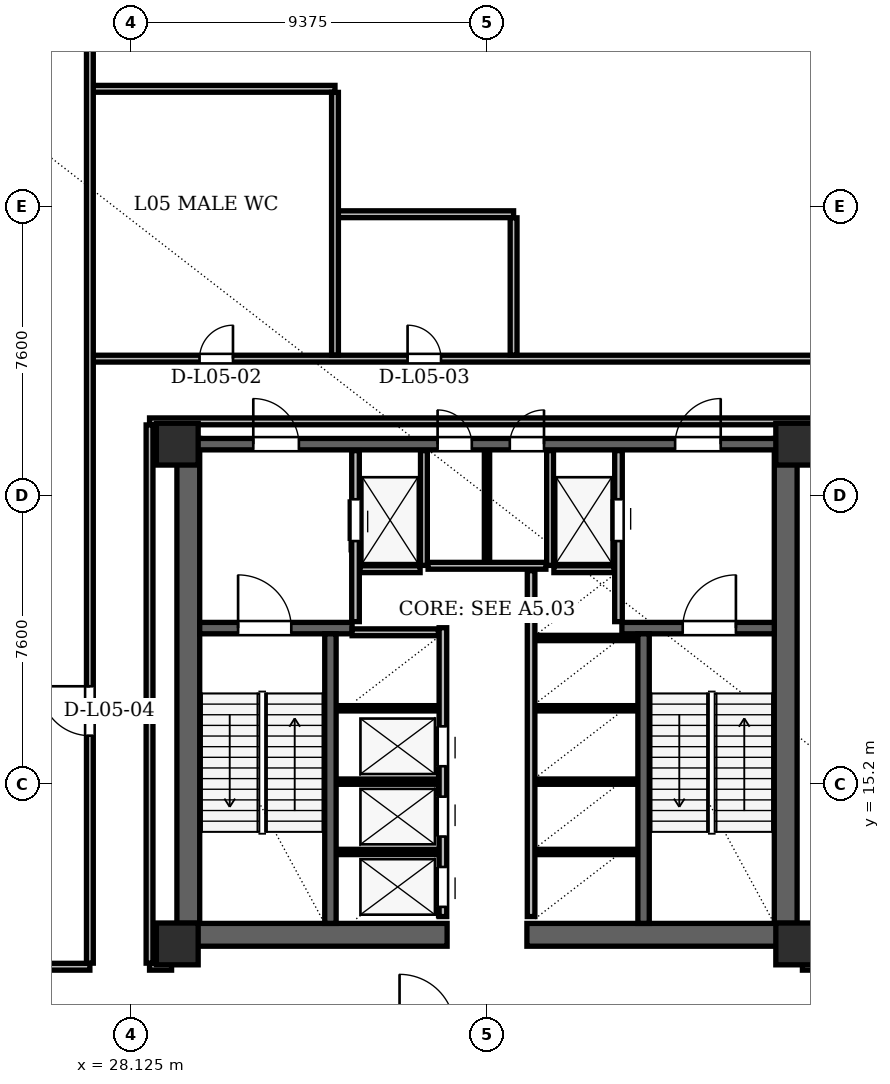
"""IFC4 building model, lengths in metres.
Left out: names, types, materials, properties, quantities, classifications, styles, units other than length and angle.
Written with IfcOpenShell. Run it as: python <this file> out.ifc"""

import sys

from ifc_helpers import new_model, si_unit, direction, frame, frame_2d, origin, origin_2d, place, context, subcontext, project, spatial, rectangle, hollow_rectangle, extrude, element, fill, save


model = new_model("IFC4")
c1 = context("Model", 3, precision=1e-05, world=origin(), true_north=direction((0.0, 1.0)))
c2 = subcontext(c1, "Body", "Model", "MODEL_VIEW")
j1 = project(units=[si_unit("LENGTHUNIT", "METRE"), si_unit("PLANEANGLEUNIT", "RADIAN")], contexts=[c1])
p1 = place(None, origin())
s1 = spatial("IfcSite", under=j1, at=p1, CompositionType="ELEMENT")
p2 = place(p1, origin())
s2 = spatial("IfcBuilding", under=s1, at=p2, CompositionType="ELEMENT")
p3 = place(p2, frame((0.0, 0.0, 22.5)))
s3 = spatial("IfcBuildingStorey", under=s2, at=p3, CompositionType="ELEMENT", Elevation=22.5)
for number, where, z_axis, x_axis in (
    (1, (29.35, 11.0, 0.0), (0.0, 0.0, 1.0), (1.0, 0.0, 0.0)),
    (2, (45.65, 11.0, 0.0), (0.0, 0.0, 1.0), (1.0, 0.0, 0.0)),
    (3, (45.65, 24.15, 0.0), (0.0, 0.0, 1.0), (1.0, 0.0, 0.0)),
    (4, (29.35, 24.15, 0.0), (0.0, 0.0, 1.0), (1.0, 0.0, 0.0)),
):
    element("IfcColumn", number, at=place(p3, frame(where, z_axis=z_axis, x_axis=x_axis)), inside=s3, PredefinedType="COLUMN", context=c2, shape_type="SweptSolid", body=[
        extrude(hollow_rectangle(XDim=1.1, YDim=1.1, WallThickness=0.09, at=origin_2d()), origin(), (0.0, 0.0, 1.0), 4.8),
    ])
for number, where, z_axis, x_axis in (
    (5, (29.64, 11.0, 0.0), (0.0, 0.0, 1.0), (0.0, 1.0, 0.0)),
    (6, (45.36, 11.0, 0.0), (0.0, 0.0, 1.0), (0.0, 1.0, 0.0)),
):
    element("IfcWall", number, at=place(p3, frame(where, z_axis=z_axis, x_axis=x_axis)), inside=s3, PredefinedType="SHEAR", context=c2, shape_type="SweptSolid", body=[
        extrude(rectangle(XDim=13.3, YDim=0.6, at=frame_2d((6.65, 0.0))), origin(), (0.0, 0.0, 1.0), 4.56),
    ])
for number, where, z_axis, x_axis in (
    (7, (29.35, 11.24, 0.0), (0.0, 0.0, 1.0), (1.0, 0.0, 0.0)),
    (8, (38.55, 11.24, 0.0), (0.0, 0.0, 1.0), (1.0, 0.0, 0.0)),
):
    element("IfcWall", number, at=place(p3, frame(where, z_axis=z_axis, x_axis=x_axis)), inside=s3, PredefinedType="SHEAR", context=c2, shape_type="SweptSolid", body=[
        extrude(rectangle(XDim=7.1, YDim=0.6, at=frame_2d((3.55, 0.0))), origin(), (0.0, 0.0, 1.0), 4.56),
    ])
p4 = place(p3, frame((29.65, 24.15, 0.0), z_axis=(0.0, 0.0, 1.0), x_axis=(1.0, 0.0, 0.0)))
e9 = element("IfcWall", 9, at=p4, inside=s3, PredefinedType="SHEAR", context=c2, shape_type="SweptSolid", body=[
    extrude(rectangle(XDim=15.7, YDim=0.3, at=frame_2d((7.85, 0.0))), origin(), (0.0, 0.0, 1.0), 4.56),
])
p5 = place(p4, frame((1.7, 0.0, 0.0)))
e10 = element("IfcOpeningElement", 10, at=p5, cuts=e9, PredefinedType="OPENING", context=c2, shape_type="SweptSolid", body=[
    extrude(rectangle(XDim=1.2, YDim=2.2, at=frame_2d((0.6, 1.1))), frame((0.0, 0.15, 0.0), z_axis=(0.0, -1.0, 0.0), x_axis=(1.0, 0.0, 0.0)), (0.0, 0.0, 1.0), 0.3),
])
p6 = place(p4, frame((12.8, 0.0, 0.0)))
e11 = element("IfcOpeningElement", 11, at=p6, cuts=e9, PredefinedType="OPENING", context=c2, shape_type="SweptSolid", body=[
    extrude(rectangle(XDim=1.2, YDim=2.2, at=frame_2d((0.6, 1.1))), frame((0.0, 0.15, 0.0), z_axis=(0.0, -1.0, 0.0), x_axis=(1.0, 0.0, 0.0)), (0.0, 0.0, 1.0), 0.3),
])
p7 = place(p4, frame((6.55, 0.0, 0.0)))
e12 = element("IfcOpeningElement", 12, at=p7, cuts=e9, PredefinedType="OPENING", context=c2, shape_type="SweptSolid", body=[
    extrude(rectangle(XDim=0.9, YDim=2.05, at=frame_2d((0.45, 1.025))), frame((0.0, 0.15, 0.0), z_axis=(0.0, -1.0, 0.0), x_axis=(1.0, 0.0, 0.0)), (0.0, 0.0, 1.0), 0.3),
])
p8 = place(p4, frame((8.45, 0.0, 0.0)))
e13 = element("IfcOpeningElement", 13, at=p8, cuts=e9, PredefinedType="OPENING", context=c2, shape_type="SweptSolid", body=[
    extrude(rectangle(XDim=0.9, YDim=2.05, at=frame_2d((0.45, 1.025))), frame((0.0, 0.15, 0.0), z_axis=(0.0, -1.0, 0.0), x_axis=(1.0, 0.0, 0.0)), (0.0, 0.0, 1.0), 0.3),
])
p9 = place(p3, frame((29.94, 19.31, 0.0), z_axis=(0.0, 0.0, 1.0), x_axis=(1.0, 0.0, 0.0)))
e14 = element("IfcWall", 14, at=p9, inside=s3, PredefinedType="SHEAR", context=c2, shape_type="SweptSolid", body=[
    extrude(rectangle(XDim=4.01, YDim=0.3, at=frame_2d((2.005, 0.0))), origin(), (0.0, 0.0, 1.0), 4.56),
])
p10 = place(p9, frame((1.01, 0.0, 0.0)))
e15 = element("IfcOpeningElement", 15, at=p10, cuts=e14, PredefinedType="OPENING", context=c2, shape_type="SweptSolid", body=[
    extrude(rectangle(XDim=1.4, YDim=2.2, at=frame_2d((0.7, 1.1))), frame((0.0, 0.15, 0.0), z_axis=(0.0, -1.0, 0.0), x_axis=(1.0, 0.0, 0.0)), (0.0, 0.0, 1.0), 0.3),
])
p11 = place(p3, frame((41.05, 19.31, 0.0), z_axis=(0.0, 0.0, 1.0), x_axis=(1.0, 0.0, 0.0)))
e16 = element("IfcWall", 16, at=p11, inside=s3, PredefinedType="SHEAR", context=c2, shape_type="SweptSolid", body=[
    extrude(rectangle(XDim=4.01, YDim=0.3, at=frame_2d((2.005, 0.0))), origin(), (0.0, 0.0, 1.0), 4.56),
])
p12 = place(p11, frame((1.6, 0.0, 0.0)))
e17 = element("IfcOpeningElement", 17, at=p12, cuts=e16, PredefinedType="OPENING", context=c2, shape_type="SweptSolid", body=[
    extrude(rectangle(XDim=1.4, YDim=2.2, at=frame_2d((0.7, 1.1))), frame((0.0, 0.15, 0.0), z_axis=(0.0, -1.0, 0.0), x_axis=(1.0, 0.0, 0.0)), (0.0, 0.0, 1.0), 0.3),
])
for number, where, z_axis, x_axis in (
    (18, (33.38, 11.54, 0.0), (0.0, 0.0, 1.0), (0.0, 1.0, 0.0)),
    (19, (41.62, 11.54, 0.0), (0.0, 0.0, 1.0), (0.0, 1.0, 0.0)),
):
    element("IfcWall", number, at=place(p3, frame(where, z_axis=z_axis, x_axis=x_axis)), inside=s3, PredefinedType="SHEAR", context=c2, shape_type="SweptSolid", body=[
        extrude(rectangle(XDim=7.62, YDim=0.3, at=frame_2d((3.81, 0.0))), origin(), (0.0, 0.0, 1.0), 4.56),
    ])
p13 = place(p3, frame((34.04, 19.48, 0.0), z_axis=(0.0, 0.0, 1.0), x_axis=(0.0, 1.0, 0.0)))
e20 = element("IfcWall", 20, at=p13, inside=s3, PredefinedType="PARTITIONING", context=c2, shape_type="SweptSolid", body=[
    extrude(rectangle(XDim=4.5, YDim=0.2, at=frame_2d((2.25, 0.0))), origin(), (0.0, 0.0, 1.0), 3.6),
])
p14 = place(p13, frame((2.12, 0.0, 0.0)))
e21 = element("IfcOpeningElement", 21, at=p14, cuts=e20, PredefinedType="OPENING", context=c2, shape_type="SweptSolid", body=[
    extrude(rectangle(XDim=1.1, YDim=2.2, at=frame_2d((0.55, 1.1))), frame((0.0, 0.1, 0.0), z_axis=(0.0, -1.0, 0.0), x_axis=(1.0, 0.0, 0.0)), (0.0, 0.0, 1.0), 0.2),
])
p15 = place(p3, frame((35.84, 20.96, 0.0), z_axis=(0.0, 0.0, 1.0), x_axis=(0.0, 1.0, 0.0)))
e22 = element("IfcWall", 22, at=p15, inside=s3, PredefinedType="PARTITIONING", context=c2, shape_type="SweptSolid", body=[
    extrude(rectangle(XDim=3.02, YDim=0.18, at=frame_2d((1.51, 0.0))), origin(), (0.0, 0.0, 1.0), 3.6),
])
p16 = place(p3, frame((34.16, 20.86, 0.0), z_axis=(0.0, 0.0, 1.0), x_axis=(1.0, 0.0, 0.0)))
e23 = element("IfcWall", 23, at=p16, inside=s3, PredefinedType="PARTITIONING", context=c2, shape_type="SweptSolid", body=[
    extrude(rectangle(XDim=1.58, YDim=0.18, at=frame_2d((0.79, 0.0))), origin(), (0.0, 0.0, 1.0), 4.56),
])
p17 = place(p3, frame((40.96, 19.48, 0.0), z_axis=(0.0, 0.0, 1.0), x_axis=(0.0, 1.0, 0.0)))
e24 = element("IfcWall", 24, at=p17, inside=s3, PredefinedType="PARTITIONING", context=c2, shape_type="SweptSolid", body=[
    extrude(rectangle(XDim=4.5, YDim=0.2, at=frame_2d((2.25, 0.0))), origin(), (0.0, 0.0, 1.0), 3.6),
])
p18 = place(p17, frame((2.12, 0.0, 0.0)))
e25 = element("IfcOpeningElement", 25, at=p18, cuts=e24, PredefinedType="OPENING", context=c2, shape_type="SweptSolid", body=[
    extrude(rectangle(XDim=1.1, YDim=2.2, at=frame_2d((0.55, 1.1))), frame((0.0, 0.1, 0.0), z_axis=(0.0, -1.0, 0.0), x_axis=(1.0, 0.0, 0.0)), (0.0, 0.0, 1.0), 0.2),
])
p19 = place(p3, frame((39.16, 20.96, 0.0), z_axis=(0.0, 0.0, 1.0), x_axis=(0.0, 1.0, 0.0)))
e26 = element("IfcWall", 26, at=p19, inside=s3, PredefinedType="PARTITIONING", context=c2, shape_type="SweptSolid", body=[
    extrude(rectangle(XDim=3.02, YDim=0.18, at=frame_2d((1.51, 0.0))), origin(), (0.0, 0.0, 1.0), 3.6),
])
p20 = place(p3, frame((39.26, 20.86, 0.0), z_axis=(0.0, 0.0, 1.0), x_axis=(1.0, 0.0, 0.0)))
e27 = element("IfcWall", 27, at=p20, inside=s3, PredefinedType="PARTITIONING", context=c2, shape_type="SweptSolid", body=[
    extrude(rectangle(XDim=1.58, YDim=0.18, at=frame_2d((0.79, 0.0))), origin(), (0.0, 0.0, 1.0), 4.56),
])
p21 = place(p3, frame((36.34, 11.72, 0.0), z_axis=(0.0, 0.0, 1.0), x_axis=(0.0, 1.0, 0.0)))
e28 = element("IfcWall", 28, at=p21, inside=s3, PredefinedType="PARTITIONING", context=c2, shape_type="SweptSolid", body=[
    extrude(rectangle(XDim=7.6, YDim=0.2, at=frame_2d((3.8, 0.0))), origin(), (0.0, 0.0, 1.0), 4.56),
])
p22 = place(p21, frame((0.255, 0.0, 0.0)))
e29 = element("IfcOpeningElement", 29, at=p22, cuts=e28, PredefinedType="OPENING", context=c2, shape_type="SweptSolid", body=[
    extrude(rectangle(XDim=1.05, YDim=2.15, at=frame_2d((0.525, 1.075))), frame((0.0, 0.1, 0.0), z_axis=(0.0, -1.0, 0.0), x_axis=(1.0, 0.0, 0.0)), (0.0, 0.0, 1.0), 0.2),
])
p23 = place(p21, frame((2.105, 0.0, 0.0)))
e30 = element("IfcOpeningElement", 30, at=p23, cuts=e28, PredefinedType="OPENING", context=c2, shape_type="SweptSolid", body=[
    extrude(rectangle(XDim=1.05, YDim=2.15, at=frame_2d((0.525, 1.075))), frame((0.0, 0.1, 0.0), z_axis=(0.0, -1.0, 0.0), x_axis=(1.0, 0.0, 0.0)), (0.0, 0.0, 1.0), 0.2),
])
p24 = place(p21, frame((3.955, 0.0, 0.0)))
e31 = element("IfcOpeningElement", 31, at=p24, cuts=e28, PredefinedType="OPENING", context=c2, shape_type="SweptSolid", body=[
    extrude(rectangle(XDim=1.05, YDim=2.15, at=frame_2d((0.525, 1.075))), frame((0.0, 0.1, 0.0), z_axis=(0.0, -1.0, 0.0), x_axis=(1.0, 0.0, 0.0)), (0.0, 0.0, 1.0), 0.2),
])
p25 = place(p3, frame((33.95, 19.2, 0.0), z_axis=(0.0, 0.0, 1.0), x_axis=(1.0, 0.0, 0.0)))
e32 = element("IfcWall", 32, at=p25, inside=s3, PredefinedType="PARTITIONING", context=c2, shape_type="SweptSolid", body=[
    extrude(rectangle(XDim=2.27, YDim=0.18, at=frame_2d((1.135, 0.0))), origin(), (0.0, 0.0, 1.0), 4.56),
])
for number, where, z_axis, x_axis in (
    (33, (33.56, 13.42, 0.0), (0.0, 0.0, 1.0), (1.0, 0.0, 0.0)),
    (34, (33.56, 15.27, 0.0), (0.0, 0.0, 1.0), (1.0, 0.0, 0.0)),
    (35, (33.56, 17.2, 0.0), (0.0, 0.0, 1.0), (1.0, 0.0, 0.0)),
):
    element("IfcWall", number, at=place(p3, frame(where, z_axis=z_axis, x_axis=x_axis)), inside=s3, PredefinedType="PARTITIONING", context=c2, shape_type="SweptSolid", body=[
        extrude(rectangle(XDim=2.66, YDim=0.14, at=frame_2d((1.33, 0.0))), origin(), (0.0, 0.0, 1.0), 4.56),
    ])
p26 = place(p3, frame((38.66, 11.72, 0.0), z_axis=(0.0, 0.0, 1.0), x_axis=(0.0, 1.0, 0.0)))
e36 = element("IfcWall", 36, at=p26, inside=s3, PredefinedType="PARTITIONING", context=c2, shape_type="SweptSolid", body=[
    extrude(rectangle(XDim=9.1, YDim=0.2, at=frame_2d((4.55, 0.0))), origin(), (0.0, 0.0, 1.0), 4.56),
])
for number, where, z_axis, x_axis in (
    (37, (38.78, 13.42, 0.0), (0.0, 0.0, 1.0), (1.0, 0.0, 0.0)),
    (38, (38.78, 15.27, 0.0), (0.0, 0.0, 1.0), (1.0, 0.0, 0.0)),
    (39, (38.78, 17.2, 0.0), (0.0, 0.0, 1.0), (1.0, 0.0, 0.0)),
    (40, (38.78, 19.05, 0.0), (0.0, 0.0, 1.0), (1.0, 0.0, 0.0)),
):
    element("IfcWall", number, at=place(p3, frame(where, z_axis=z_axis, x_axis=x_axis)), inside=s3, PredefinedType="PARTITIONING", context=c2, shape_type="SweptSolid", body=[
        extrude(rectangle(XDim=2.66, YDim=0.14, at=frame_2d((1.33, 0.0))), origin(), (0.0, 0.0, 1.0), 4.56),
    ])
p27 = place(p3, frame((35.95, 20.95, 0.0), z_axis=(0.0, 0.0, 1.0), x_axis=(1.0, 0.0, 0.0)))
e41 = element("IfcWall", 41, at=p27, inside=s3, PredefinedType="PARTITIONING", context=c2, shape_type="SweptSolid", body=[
    extrude(rectangle(XDim=3.1, YDim=0.18, at=frame_2d((1.55, 0.0))), origin(), (0.0, 0.0, 1.0), 4.56),
])
p28 = place(p3, frame((37.5, 21.06, 0.0), z_axis=(0.0, 0.0, 1.0), x_axis=(0.0, 1.0, 0.0)))
e42 = element("IfcWall", 42, at=p28, inside=s3, PredefinedType="PARTITIONING", context=c2, shape_type="SweptSolid", body=[
    extrude(rectangle(XDim=2.92, YDim=0.14, at=frame_2d((1.46, 0.0))), origin(), (0.0, 0.0, 1.0), 3.6),
])
p29 = place(p3, frame((16.25, 10.4, 0.0), z_axis=(0.0, 0.0, 1.0), x_axis=(1.0, 0.0, 0.0)))
e43 = element("IfcWall", 43, at=p29, inside=s3, PredefinedType="PARTITIONING", context=c2, shape_type="SweptSolid", body=[
    extrude(rectangle(XDim=10.8, YDim=0.18, at=frame_2d((5.4, 0.0))), origin(), (0.0, 0.0, 1.0), 4.56),
])
for number, where, z_axis, x_axis in (
    (44, (28.62, 10.4, 0.0), (0.0, 0.0, 1.0), (1.0, 0.0, 0.0)),
    (45, (45.8, 10.4, 0.0), (0.0, 0.0, 1.0), (1.0, 0.0, 0.0)),
):
    element("IfcWall", number, at=place(p3, frame(where, z_axis=z_axis, x_axis=x_axis)), inside=s3, PredefinedType="PARTITIONING", context=c2, shape_type="SweptSolid", body=[
        extrude(rectangle(XDim=0.58, YDim=0.18, at=frame_2d((0.29, 0.0))), origin(), (0.0, 0.0, 1.0), 3.623),
    ])
p30 = place(p3, frame((28.62, 24.75, 0.0), z_axis=(0.0, 0.0, 1.0), x_axis=(1.0, 0.0, 0.0)))
e46 = element("IfcWall", 46, at=p30, inside=s3, PredefinedType="PARTITIONING", context=c2, shape_type="SweptSolid", body=[
    extrude(rectangle(XDim=17.76, YDim=0.18, at=frame_2d((8.88, 0.0))), origin(), (0.0, 0.0, 1.0), 3.623),
])
p31 = place(p3, frame((27.05, 26.4, 0.0), z_axis=(0.0, 0.0, 1.0), x_axis=(1.0, 0.0, 0.0)))
e47 = element("IfcWall", 47, at=p31, inside=s3, PredefinedType="PARTITIONING", context=c2, shape_type="SweptSolid", body=[
    extrude(rectangle(XDim=28.55, YDim=0.18, at=frame_2d((14.275, 0.0))), origin(), (0.0, 0.0, 1.0), 3.35),
])
p32 = place(p31, frame((2.885, 0.0, 0.0)))
e48 = element("IfcOpeningElement", 48, at=p32, cuts=e47, PredefinedType="OPENING", context=c2, shape_type="SweptSolid", body=[
    extrude(rectangle(XDim=0.88, YDim=2.08, at=frame_2d((0.44, 1.04))), frame((0.0, 0.09, 0.0), z_axis=(0.0, -1.0, 0.0), x_axis=(1.0, 0.0, 0.0)), (0.0, 0.0, 1.0), 0.18),
])
p33 = place(p31, frame((8.36, 0.0, 0.0)))
e49 = element("IfcOpeningElement", 49, at=p33, cuts=e47, PredefinedType="OPENING", context=c2, shape_type="SweptSolid", body=[
    extrude(rectangle(XDim=0.88, YDim=2.08, at=frame_2d((0.44, 1.04))), frame((0.0, 0.09, 0.0), z_axis=(0.0, -1.0, 0.0), x_axis=(1.0, 0.0, 0.0)), (0.0, 0.0, 1.0), 0.18),
])
p34 = place(p3, frame((33.5, 30.2, 0.0), z_axis=(0.0, 0.0, 1.0), x_axis=(1.0, 0.0, 0.0)))
e50 = element("IfcWall", 50, at=p34, inside=s3, PredefinedType="PARTITIONING", context=c2, shape_type="SweptSolid", body=[
    extrude(rectangle(XDim=4.7, YDim=0.18, at=frame_2d((2.35, 0.0))), origin(), (0.0, 0.0, 1.0), 4.56),
])
p35 = place(p3, frame((27.05, 33.5, 0.0), z_axis=(0.0, 0.0, 1.0), x_axis=(1.0, 0.0, 0.0)))
e51 = element("IfcWall", 51, at=p35, inside=s3, PredefinedType="PARTITIONING", context=c2, shape_type="SweptSolid", body=[
    extrude(rectangle(XDim=6.45, YDim=0.18, at=frame_2d((3.225, 0.0))), origin(), (0.0, 0.0, 1.0), 3.623),
])
p36 = place(p3, frame((27.05, 10.494, 0.0), z_axis=(0.0, 0.0, 1.0), x_axis=(0.0, 1.0, 0.0)))
e52 = element("IfcWall", 52, at=p36, inside=s3, PredefinedType="PARTITIONING", context=c2, shape_type="SweptSolid", body=[
    extrude(rectangle(XDim=28.386, YDim=0.18, at=frame_2d((14.193, 0.0))), origin(), (0.0, 0.0, 1.0), 3.35),
])
p37 = place(p36, frame((5.985, 0.0, 0.0)))
e53 = element("IfcOpeningElement", 53, at=p37, cuts=e52, PredefinedType="OPENING", context=c2, shape_type="SweptSolid", body=[
    extrude(rectangle(XDim=1.3, YDim=2.2, at=frame_2d((0.65, 1.1))), frame((0.0, 0.09, 0.0), z_axis=(0.0, -1.0, 0.0), x_axis=(1.0, 0.0, 0.0)), (0.0, 0.0, 1.0), 0.18),
])
p38 = place(p3, frame((28.62, 10.494, 0.0), z_axis=(0.0, 0.0, 1.0), x_axis=(0.0, 1.0, 0.0)))
e54 = element("IfcWall", 54, at=p38, inside=s3, PredefinedType="PARTITIONING", context=c2, shape_type="SweptSolid", body=[
    extrude(rectangle(XDim=14.162, YDim=0.18, at=frame_2d((7.081, 0.0))), origin(), (0.0, 0.0, 1.0), 3.623),
])
p39 = place(p3, frame((33.5, 26.494, 0.0), z_axis=(0.0, 0.0, 1.0), x_axis=(0.0, 1.0, 0.0)))
e55 = element("IfcWall", 55, at=p39, inside=s3, PredefinedType="PARTITIONING", context=c2, shape_type="SweptSolid", body=[
    extrude(rectangle(XDim=6.912, YDim=0.18, at=frame_2d((3.456, 0.0))), origin(), (0.0, 0.0, 1.0), 4.56),
])
p40 = place(p3, frame((38.2, 26.494, 0.0), z_axis=(0.0, 0.0, 1.0), x_axis=(0.0, 1.0, 0.0)))
e56 = element("IfcWall", 56, at=p40, inside=s3, PredefinedType="PARTITIONING", context=c2, shape_type="SweptSolid", body=[
    extrude(rectangle(XDim=3.612, YDim=0.18, at=frame_2d((1.806, 0.0))), origin(), (0.0, 0.0, 1.0), 4.56),
])
p41 = place(p14, origin())
e57 = element("IfcDoor", 57, at=p41, inside=s3, OperationType="SLIDING_TO_LEFT", PredefinedType="DOOR", context=c2, shape_type="SweptSolid", body=[
    extrude(rectangle(XDim=1.1, YDim=2.2, at=frame_2d((0.55, 1.1))), frame((0.0, 0.025, 0.0), z_axis=(0.0, -1.0, 0.0), x_axis=(1.0, 0.0, 0.0)), (0.0, 0.0, 1.0), 0.05),
])
fill(e21, e57)
p42 = place(p18, origin())
e58 = element("IfcDoor", 58, at=p42, inside=s3, OperationType="SLIDING_TO_RIGHT", PredefinedType="DOOR", context=c2, shape_type="SweptSolid", body=[
    extrude(rectangle(XDim=1.1, YDim=2.2, at=frame_2d((0.55, 1.1))), frame((0.0, 0.025, 0.0), z_axis=(0.0, -1.0, 0.0), x_axis=(1.0, 0.0, 0.0)), (0.0, 0.0, 1.0), 0.05),
])
fill(e25, e58)
p43 = place(p22, origin())
e59 = element("IfcDoor", 59, at=p43, inside=s3, OperationType="SLIDING_TO_LEFT", PredefinedType="DOOR", context=c2, shape_type="SweptSolid", body=[
    extrude(rectangle(XDim=1.05, YDim=2.15, at=frame_2d((0.525, 1.075))), frame((0.0, 0.025, 0.0), z_axis=(0.0, -1.0, 0.0), x_axis=(1.0, 0.0, 0.0)), (0.0, 0.0, 1.0), 0.05),
])
fill(e29, e59)
p44 = place(p23, origin())
e60 = element("IfcDoor", 60, at=p44, inside=s3, OperationType="SLIDING_TO_RIGHT", PredefinedType="DOOR", context=c2, shape_type="SweptSolid", body=[
    extrude(rectangle(XDim=1.05, YDim=2.15, at=frame_2d((0.525, 1.075))), frame((0.0, 0.025, 0.0), z_axis=(0.0, -1.0, 0.0), x_axis=(1.0, 0.0, 0.0)), (0.0, 0.0, 1.0), 0.05),
])
fill(e30, e60)
p45 = place(p24, origin())
e61 = element("IfcDoor", 61, at=p45, inside=s3, OperationType="SLIDING_TO_LEFT", PredefinedType="DOOR", context=c2, shape_type="SweptSolid", body=[
    extrude(rectangle(XDim=1.05, YDim=2.15, at=frame_2d((0.525, 1.075))), frame((0.0, 0.025, 0.0), z_axis=(0.0, -1.0, 0.0), x_axis=(1.0, 0.0, 0.0)), (0.0, 0.0, 1.0), 0.05),
])
fill(e31, e61)
p46 = place(p10, origin())
e62 = element("IfcDoor", 62, at=p46, inside=s3, OperationType="SINGLE_SWING_LEFT", PredefinedType="DOOR", context=c2, shape_type="SweptSolid", body=[
    extrude(rectangle(XDim=1.4, YDim=2.2, at=frame_2d((0.7, 1.1))), frame((0.0, 0.025, 0.0), z_axis=(0.0, -1.0, 0.0), x_axis=(1.0, 0.0, 0.0)), (0.0, 0.0, 1.0), 0.05),
])
fill(e15, e62)
p47 = place(p12, origin())
e63 = element("IfcDoor", 63, at=p47, inside=s3, OperationType="SINGLE_SWING_RIGHT", PredefinedType="DOOR", context=c2, shape_type="SweptSolid", body=[
    extrude(rectangle(XDim=1.4, YDim=2.2, at=frame_2d((0.7, 1.1))), frame((0.0, 0.025, 0.0), z_axis=(0.0, -1.0, 0.0), x_axis=(1.0, 0.0, 0.0)), (0.0, 0.0, 1.0), 0.05),
])
fill(e17, e63)
p48 = place(p5, origin())
e64 = element("IfcDoor", 64, at=p48, inside=s3, OperationType="SINGLE_SWING_LEFT", PredefinedType="DOOR", context=c2, shape_type="SweptSolid", body=[
    extrude(rectangle(XDim=1.2, YDim=2.2, at=frame_2d((0.6, 1.1))), frame((0.0, 0.025, 0.0), z_axis=(0.0, -1.0, 0.0), x_axis=(1.0, 0.0, 0.0)), (0.0, 0.0, 1.0), 0.05),
])
fill(e10, e64)
p49 = place(p6, origin())
e65 = element("IfcDoor", 65, at=p49, inside=s3, OperationType="SINGLE_SWING_RIGHT", PredefinedType="DOOR", context=c2, shape_type="SweptSolid", body=[
    extrude(rectangle(XDim=1.2, YDim=2.2, at=frame_2d((0.6, 1.1))), frame((0.0, 0.025, 0.0), z_axis=(0.0, -1.0, 0.0), x_axis=(1.0, 0.0, 0.0)), (0.0, 0.0, 1.0), 0.05),
])
fill(e11, e65)
p50 = place(p7, origin())
e66 = element("IfcDoor", 66, at=p50, inside=s3, OperationType="SINGLE_SWING_LEFT", PredefinedType="DOOR", context=c2, shape_type="SweptSolid", body=[
    extrude(rectangle(XDim=0.9, YDim=2.05, at=frame_2d((0.45, 1.025))), frame((0.0, 0.025, 0.0), z_axis=(0.0, -1.0, 0.0), x_axis=(1.0, 0.0, 0.0)), (0.0, 0.0, 1.0), 0.05),
])
fill(e12, e66)
p51 = place(p8, origin())
e67 = element("IfcDoor", 67, at=p51, inside=s3, OperationType="SINGLE_SWING_RIGHT", PredefinedType="DOOR", context=c2, shape_type="SweptSolid", body=[
    extrude(rectangle(XDim=0.9, YDim=2.05, at=frame_2d((0.45, 1.025))), frame((0.0, 0.025, 0.0), z_axis=(0.0, -1.0, 0.0), x_axis=(1.0, 0.0, 0.0)), (0.0, 0.0, 1.0), 0.05),
])
fill(e13, e67)
p52 = place(p32, origin())
e68 = element("IfcDoor", 68, at=p52, inside=s3, OperationType="SINGLE_SWING_RIGHT", PredefinedType="DOOR", context=c2, shape_type="SweptSolid", body=[
    extrude(rectangle(XDim=0.88, YDim=2.08, at=frame_2d((0.44, 1.04))), frame((0.0, 0.025, 0.0), z_axis=(0.0, -1.0, 0.0), x_axis=(1.0, 0.0, 0.0)), (0.0, 0.0, 1.0), 0.05),
])
fill(e48, e68)
p53 = place(p33, origin())
e69 = element("IfcDoor", 69, at=p53, inside=s3, OperationType="SINGLE_SWING_LEFT", PredefinedType="DOOR", context=c2, shape_type="SweptSolid", body=[
    extrude(rectangle(XDim=0.88, YDim=2.08, at=frame_2d((0.44, 1.04))), frame((0.0, 0.025, 0.0), z_axis=(0.0, -1.0, 0.0), x_axis=(1.0, 0.0, 0.0)), (0.0, 0.0, 1.0), 0.05),
])
fill(e49, e69)
p54 = place(p37, origin())
e70 = element("IfcDoor", 70, at=p54, inside=s3, OperationType="SINGLE_SWING_RIGHT", PredefinedType="DOOR", context=c2, shape_type="SweptSolid", body=[
    extrude(rectangle(XDim=1.3, YDim=2.2, at=frame_2d((0.65, 1.1))), frame((0.0, 0.025, 0.0), z_axis=(0.0, -1.0, 0.0), x_axis=(1.0, 0.0, 0.0)), (0.0, 0.0, 1.0), 0.05),
])
fill(e53, e70)
save(model, sys.argv[1])
